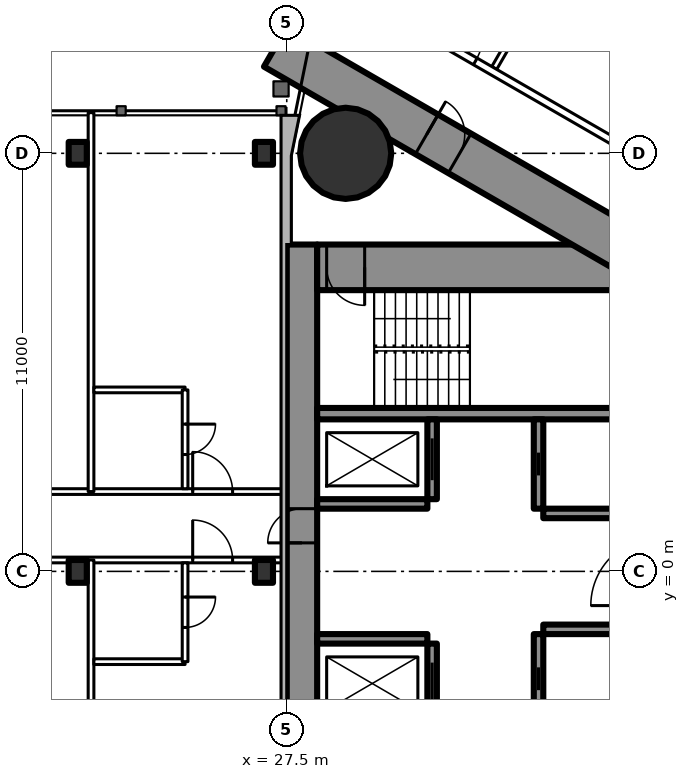
"""IFC4 building model, lengths in metres.
Left out: names, types, materials, properties, quantities, classifications, styles, units other than length and angle.
Written with IfcOpenShell. Run it as: python <this file> out.ifc"""

import sys

from ifc_helpers import new_model, si_unit, direction, frame, frame_2d, origin, origin_2d, place, context, subcontext, project, spatial, rectangle, circle, i_section, extrude, element, fill, save


model = new_model("IFC4")
c1 = context("Model", 3, precision=1e-05, world=origin(), true_north=direction((0.0, 1.0)))
c2 = subcontext(c1, "Body", "Model", "MODEL_VIEW")
j1 = project(units=[si_unit("LENGTHUNIT", "METRE"), si_unit("PLANEANGLEUNIT", "RADIAN")], contexts=[c1])
p1 = place(None, origin())
s1 = spatial("IfcSite", under=j1, at=p1, CompositionType="ELEMENT")
p2 = place(p1, origin())
s2 = spatial("IfcBuilding", under=s1, at=p2, CompositionType="ELEMENT")
p3 = place(p2, frame((0.0, 0.0, 226.1)))
s3 = spatial("IfcBuildingStorey", under=s2, at=p3, CompositionType="ELEMENT", Elevation=226.1)
p4 = place(p3, frame((29.05, 11.0, 0.0), z_axis=(0.0, 0.0, 1.0), x_axis=(1.0, 0.0, 0.0)))
e1 = element("IfcColumn", 1, at=p4, inside=s3, PredefinedType="COLUMN", context=c2, shape_type="SweptSolid", body=[
    extrude(circle(Radius=1.2, at=origin_2d()), origin(), (0.0, 0.0, 1.0), 3.6),
])
p5 = place(p3, frame((27.9, -8.6, 0.0), z_axis=(0.0, 0.0, 1.0), x_axis=(0.0, 1.0, 0.0)))
e2 = element("IfcWall", 2, at=p5, inside=s3, PredefinedType="SHEAR", context=c2, shape_type="SweptSolid", body=[
    extrude(rectangle(XDim=17.2, YDim=0.8, at=frame_2d((8.6, 0.0))), origin(), (0.0, 0.0, 1.0), 3.6),
])
p6 = place(p5, frame((9.35, 0.0, 0.0)))
e3 = element("IfcOpeningElement", 3, at=p6, cuts=e2, PredefinedType="OPENING", context=c2, shape_type="SweptSolid", body=[
    extrude(rectangle(XDim=0.9, YDim=2.2, at=frame_2d((0.45, 1.1))), frame((0.0, 0.41, 0.0), z_axis=(0.0, -1.0, 0.0), x_axis=(1.0, 0.0, 0.0)), (0.0, 0.0, 1.0), 0.82),
])
p7 = place(p3, frame((28.3, 8.0, 0.0), z_axis=(0.0, 0.0, 1.0), x_axis=(1.0, 0.0, 0.0)))
e4 = element("IfcWall", 4, at=p7, inside=s3, PredefinedType="SHEAR", context=c2, shape_type="SweptSolid", body=[
    extrude(rectangle(XDim=8.4, YDim=1.2, at=frame_2d((4.2, 0.0))), origin(), (0.0, 0.0, 1.0), 3.6),
])
p8 = place(p7, frame((0.25, 0.0, 0.0)))
e5 = element("IfcOpeningElement", 5, at=p8, cuts=e4, PredefinedType="OPENING", context=c2, shape_type="SweptSolid", body=[
    extrude(rectangle(XDim=1.0, YDim=2.2, at=frame_2d((0.5, 1.1))), frame((0.0, 0.61, 0.0), z_axis=(0.0, -1.0, 0.0), x_axis=(1.0, 0.0, 0.0)), (0.0, 0.0, 1.0), 1.22),
])
p9 = place(p3, frame((28.3, 4.15, 0.0), z_axis=(0.0, 0.0, 1.0), x_axis=(1.0, 0.0, 0.0)))
e6 = element("IfcWall", 6, at=p9, inside=s3, PredefinedType="SHEAR", context=c2, shape_type="SweptSolid", body=[
    extrude(rectangle(XDim=8.4, YDim=0.3, at=frame_2d((4.2, 0.0))), origin(), (0.0, 0.0, 1.0), 3.6),
])
p10 = place(p3, frame((31.325, -4.0, 0.0), z_axis=(0.0, 0.0, 1.0), x_axis=(0.0, 1.0, 0.0)))
e7 = element("IfcWall", 7, at=p10, inside=s3, PredefinedType="SHEAR", context=c2, shape_type="SweptSolid", body=[
    extrude(rectangle(XDim=2.1, YDim=0.25, at=frame_2d((1.05, 0.0))), origin(), (0.0, 0.0, 1.0), 3.6),
])
p11 = place(p10, frame((0.5, 0.0, 0.0)))
e8 = element("IfcOpeningElement", 8, at=p11, cuts=e7, PredefinedType="OPENING", context=c2, shape_type="SweptSolid", body=[
    extrude(rectangle(XDim=1.1, YDim=2.2, at=frame_2d((0.55, 1.1))), frame((0.0, 0.135, 0.0), z_axis=(0.0, -1.0, 0.0), x_axis=(1.0, 0.0, 0.0)), (0.0, 0.0, 1.0), 0.27),
])
p12 = place(p3, frame((34.125, -4.0, 0.0), z_axis=(0.0, 0.0, 1.0), x_axis=(0.0, 1.0, 0.0)))
e9 = element("IfcWall", 9, at=p12, inside=s3, PredefinedType="SHEAR", context=c2, shape_type="SweptSolid", body=[
    extrude(rectangle(XDim=2.35, YDim=0.25, at=frame_2d((1.175, 0.0))), origin(), (0.0, 0.0, 1.0), 3.6),
])
p13 = place(p12, frame((0.875, 0.0, 0.0)))
e10 = element("IfcOpeningElement", 10, at=p13, cuts=e9, PredefinedType="OPENING", context=c2, shape_type="SweptSolid", body=[
    extrude(rectangle(XDim=0.6, YDim=2.0, at=frame_2d((0.3, 1.0))), frame((0.0, 0.135, 0.0), z_axis=(0.0, -1.0, 0.0), x_axis=(1.0, 0.0, 0.0)), (0.0, 0.0, 1.0), 0.27),
])
p14 = place(p3, frame((28.3, -1.775, 0.0), z_axis=(0.0, 0.0, 1.0), x_axis=(1.0, 0.0, 0.0)))
e11 = element("IfcWall", 11, at=p14, inside=s3, PredefinedType="SHEAR", context=c2, shape_type="SweptSolid", body=[
    extrude(rectangle(XDim=2.9, YDim=0.25, at=frame_2d((1.45, 0.0))), origin(), (0.0, 0.0, 1.0), 3.6),
])
p15 = place(p3, frame((34.25, -1.525, 0.0), z_axis=(0.0, 0.0, 1.0), x_axis=(1.0, 0.0, 0.0)))
e12 = element("IfcWall", 12, at=p15, inside=s3, PredefinedType="SHEAR", context=c2, shape_type="SweptSolid", body=[
    extrude(rectangle(XDim=2.45, YDim=0.25, at=frame_2d((1.225, 0.0))), origin(), (0.0, 0.0, 1.0), 3.6),
])
p16 = place(p3, frame((31.325, 1.9, 0.0), z_axis=(0.0, 0.0, 1.0), x_axis=(0.0, 1.0, 0.0)))
e13 = element("IfcWall", 13, at=p16, inside=s3, PredefinedType="SHEAR", context=c2, shape_type="SweptSolid", body=[
    extrude(rectangle(XDim=2.1, YDim=0.25, at=frame_2d((1.05, 0.0))), origin(), (0.0, 0.0, 1.0), 3.6),
])
p17 = place(p16, frame((0.5, 0.0, 0.0)))
e14 = element("IfcOpeningElement", 14, at=p17, cuts=e13, PredefinedType="OPENING", context=c2, shape_type="SweptSolid", body=[
    extrude(rectangle(XDim=1.1, YDim=2.2, at=frame_2d((0.55, 1.1))), frame((0.0, 0.135, 0.0), z_axis=(0.0, -1.0, 0.0), x_axis=(1.0, 0.0, 0.0)), (0.0, 0.0, 1.0), 0.27),
])
p18 = place(p3, frame((34.125, 1.65, 0.0), z_axis=(0.0, 0.0, 1.0), x_axis=(0.0, 1.0, 0.0)))
e15 = element("IfcWall", 15, at=p18, inside=s3, PredefinedType="SHEAR", context=c2, shape_type="SweptSolid", body=[
    extrude(rectangle(XDim=2.35, YDim=0.25, at=frame_2d((1.175, 0.0))), origin(), (0.0, 0.0, 1.0), 3.6),
])
p19 = place(p18, frame((0.875, 0.0, 0.0)))
e16 = element("IfcOpeningElement", 16, at=p19, cuts=e15, PredefinedType="OPENING", context=c2, shape_type="SweptSolid", body=[
    extrude(rectangle(XDim=0.6, YDim=2.0, at=frame_2d((0.3, 1.0))), frame((0.0, 0.135, 0.0), z_axis=(0.0, -1.0, 0.0), x_axis=(1.0, 0.0, 0.0)), (0.0, 0.0, 1.0), 0.27),
])
p20 = place(p3, frame((28.3, 1.775, 0.0), z_axis=(0.0, 0.0, 1.0), x_axis=(1.0, 0.0, 0.0)))
e17 = element("IfcWall", 17, at=p20, inside=s3, PredefinedType="SHEAR", context=c2, shape_type="SweptSolid", body=[
    extrude(rectangle(XDim=2.9, YDim=0.25, at=frame_2d((1.45, 0.0))), origin(), (0.0, 0.0, 1.0), 3.6),
])
p21 = place(p3, frame((34.25, 1.525, 0.0), z_axis=(0.0, 0.0, 1.0), x_axis=(1.0, 0.0, 0.0)))
e18 = element("IfcWall", 18, at=p21, inside=s3, PredefinedType="SHEAR", context=c2, shape_type="SweptSolid", body=[
    extrude(rectangle(XDim=2.45, YDim=0.25, at=frame_2d((1.225, 0.0))), origin(), (0.0, 0.0, 1.0), 3.6),
])
p22 = place(p3, frame((27.2, -13.8, 0.0), z_axis=(0.0, 0.0, 1.0), x_axis=(0.866027159892, 0.499996958321, 0.0)))
e19 = element("IfcWall", 19, at=p22, inside=s3, PredefinedType="SHEAR", context=c2, shape_type="SweptSolid", body=[
    extrude(rectangle(XDim=27.947, YDim=1.2, at=frame_2d((13.973, 0.0))), origin(), (0.0, 0.0, 1.0), 3.6),
])
p23 = place(p22, frame((4.6, 0.0, 0.0)))
e20 = element("IfcOpeningElement", 20, at=p23, cuts=e19, PredefinedType="OPENING", context=c2, shape_type="SweptSolid", body=[
    extrude(rectangle(XDim=1.0, YDim=2.2, at=frame_2d((0.5, 1.1))), frame((0.0, 0.61, 0.0), z_axis=(0.0, -1.0, 0.0), x_axis=(1.0, 0.0, 0.0)), (0.0, 0.0, 1.0), 1.22),
])
p24 = place(p22, frame((13.395, 0.0, 0.0)))
e21 = element("IfcOpeningElement", 21, at=p24, cuts=e19, PredefinedType="OPENING", context=c2, shape_type="SweptSolid", body=[
    extrude(rectangle(XDim=1.8, YDim=2.2, at=frame_2d((0.9, 1.1))), frame((0.0, 0.61, 0.0), z_axis=(0.0, -1.0, 0.0), x_axis=(1.0, 0.0, 0.0)), (0.0, 0.0, 1.0), 1.22),
])
p25 = place(p3, frame((27.2, 13.8, 0.0), z_axis=(0.0, 0.0, 1.0), x_axis=(0.866024515034, -0.500001539357, 0.0)))
e22 = element("IfcWall", 22, at=p25, inside=s3, PredefinedType="SHEAR", context=c2, shape_type="SweptSolid", body=[
    extrude(rectangle(XDim=26.907, YDim=1.2, at=frame_2d((13.454, 0.0))), origin(), (0.0, 0.0, 1.0), 3.6),
])
p26 = place(p25, frame((4.6, 0.0, 0.0)))
e23 = element("IfcOpeningElement", 23, at=p26, cuts=e22, PredefinedType="OPENING", context=c2, shape_type="SweptSolid", body=[
    extrude(rectangle(XDim=1.0, YDim=2.2, at=frame_2d((0.5, 1.1))), frame((0.0, 0.61, 0.0), z_axis=(0.0, -1.0, 0.0), x_axis=(1.0, 0.0, 0.0)), (0.0, 0.0, 1.0), 1.22),
])
p27 = place(p25, frame((13.395, 0.0, 0.0)))
e24 = element("IfcOpeningElement", 24, at=p27, cuts=e22, PredefinedType="OPENING", context=c2, shape_type="SweptSolid", body=[
    extrude(rectangle(XDim=1.8, YDim=2.2, at=frame_2d((0.9, 1.1))), frame((0.0, 0.61, 0.0), z_axis=(0.0, -1.0, 0.0), x_axis=(1.0, 0.0, 0.0)), (0.0, 0.0, 1.0), 1.22),
])
for number, where, z_axis, x_axis in (
    (25, (22.0, 0.0, 0.0), (0.0, 0.0, 1.0), (1.0, 0.0, 0.0)),
    (26, (26.9, 0.0, 0.0), (0.0, 0.0, 1.0), (1.0, 0.0, 0.0)),
    (27, (22.0, 11.0, 0.0), (0.0, 0.0, 1.0), (1.0, 0.0, 0.0)),
    (28, (26.9, 11.0, 0.0), (0.0, 0.0, 1.0), (1.0, 0.0, 0.0)),
):
    element("IfcColumn", number, at=place(p3, frame(where, z_axis=z_axis, x_axis=x_axis)), inside=s3, PredefinedType="COLUMN", context=c2, shape_type="SweptSolid", body=[
        extrude(i_section(OverallWidth=0.476, OverallDepth=0.6, WebThickness=0.1, FlangeThickness=0.14, FilletRadius=0.02, at=origin_2d()), origin(), (0.0, 0.0, 1.0), 3.6),
    ])
p28 = place(p3, frame((32.96, 13.246, 0.0), z_axis=(0.0, 0.0, 1.0), x_axis=(0.500000236886, 0.866025267018, 0.0)))
e29 = element("IfcWall", 29, at=p28, inside=s3, PredefinedType="PARTITIONING", context=c2, shape_type="SweptSolid", body=[
    extrude(rectangle(XDim=7.583, YDim=0.15, at=frame_2d((3.791, 0.0))), origin(), (0.0, 0.0, 1.0), 3.35),
])
p29 = place(p3, frame((28.959, 15.44, 0.0), z_axis=(0.0, 0.0, 1.0), x_axis=(0.866028936079, -0.499993881836, 0.0)))
e30 = element("IfcWall", 30, at=p29, inside=s3, PredefinedType="PARTITIONING", context=c2, shape_type="SweptSolid", body=[
    extrude(rectangle(XDim=20.503, YDim=0.2, at=frame_2d((10.251, 0.0))), origin(), (0.0, 0.0, 1.0), 3.35),
])
p30 = place(p29, frame((16.137, 0.0, 0.0)))
e31 = element("IfcOpeningElement", 31, at=p30, cuts=e30, PredefinedType="OPENING", context=c2, shape_type="SweptSolid", body=[
    extrude(rectangle(XDim=0.95, YDim=2.2, at=frame_2d((0.475, 1.1))), frame((0.0, 0.11, 0.0), z_axis=(0.0, -1.0, 0.0), x_axis=(1.0, 0.0, 0.0)), (0.0, 0.0, 1.0), 0.22),
])
p31 = place(p29, frame((14.437, 0.0, 0.0)))
e32 = element("IfcOpeningElement", 32, at=p31, cuts=e30, PredefinedType="OPENING", context=c2, shape_type="SweptSolid", body=[
    extrude(rectangle(XDim=0.95, YDim=2.2, at=frame_2d((0.475, 1.1))), frame((0.0, 0.11, 0.0), z_axis=(0.0, -1.0, 0.0), x_axis=(1.0, 0.0, 0.0)), (0.0, 0.0, 1.0), 0.22),
])
p32 = place(p29, frame((2.244, 0.0, 0.0)))
e33 = element("IfcOpeningElement", 33, at=p32, cuts=e30, PredefinedType="OPENING", context=c2, shape_type="SweptSolid", body=[
    extrude(rectangle(XDim=1.8, YDim=2.04, at=frame_2d((0.9, 1.02))), frame((0.0, 0.11, 0.0), z_axis=(0.0, -1.0, 0.0), x_axis=(1.0, 0.0, 0.0)), (0.0, 0.0, 1.0), 0.22),
])
p33 = place(p3, frame((-27.5, 0.3, 0.0), z_axis=(0.0, 0.0, 1.0), x_axis=(1.0, 0.0, 0.0)))
e34 = element("IfcWall", 34, at=p33, inside=s3, PredefinedType="PARTITIONING", context=c2, shape_type="SweptSolid", body=[
    extrude(rectangle(XDim=55.0, YDim=0.15, at=frame_2d((27.5, 0.0))), origin(), (0.0, 0.0, 1.0), 2.4),
])
p34 = place(p33, frame((1.575, 0.0, 0.0)))
e35 = element("IfcOpeningElement", 35, at=p34, cuts=e34, PredefinedType="OPENING", context=c2, shape_type="SweptSolid", body=[
    extrude(rectangle(XDim=1.0, YDim=2.2, at=frame_2d((0.5, 1.1))), frame((0.0, 0.085, 0.0), z_axis=(0.0, -1.0, 0.0), x_axis=(1.0, 0.0, 0.0)), (0.0, 0.0, 1.0), 0.17),
])
p35 = place(p33, frame((7.525, 0.0, 0.0)))
e36 = element("IfcOpeningElement", 36, at=p35, cuts=e34, PredefinedType="OPENING", context=c2, shape_type="SweptSolid", body=[
    extrude(rectangle(XDim=1.05, YDim=2.4, at=frame_2d((0.525, 1.2))), frame((0.0, 0.085, 0.0), z_axis=(0.0, -1.0, 0.0), x_axis=(1.0, 0.0, 0.0)), (0.0, 0.0, 1.0), 0.17),
])
p36 = place(p33, frame((18.525, 0.0, 0.0)))
e37 = element("IfcOpeningElement", 37, at=p36, cuts=e34, PredefinedType="OPENING", context=c2, shape_type="SweptSolid", body=[
    extrude(rectangle(XDim=1.05, YDim=2.4, at=frame_2d((0.525, 1.2))), frame((0.0, 0.085, 0.0), z_axis=(0.0, -1.0, 0.0), x_axis=(1.0, 0.0, 0.0)), (0.0, 0.0, 1.0), 0.17),
])
p37 = place(p33, frame((24.025, 0.0, 0.0)))
e38 = element("IfcOpeningElement", 38, at=p37, cuts=e34, PredefinedType="OPENING", context=c2, shape_type="SweptSolid", body=[
    extrude(rectangle(XDim=1.05, YDim=2.4, at=frame_2d((0.525, 1.2))), frame((0.0, 0.085, 0.0), z_axis=(0.0, -1.0, 0.0), x_axis=(1.0, 0.0, 0.0)), (0.0, 0.0, 1.0), 0.17),
])
p38 = place(p33, frame((35.025, 0.0, 0.0)))
e39 = element("IfcOpeningElement", 39, at=p38, cuts=e34, PredefinedType="OPENING", context=c2, shape_type="SweptSolid", body=[
    extrude(rectangle(XDim=1.05, YDim=2.4, at=frame_2d((0.525, 1.2))), frame((0.0, 0.085, 0.0), z_axis=(0.0, -1.0, 0.0), x_axis=(1.0, 0.0, 0.0)), (0.0, 0.0, 1.0), 0.17),
])
p39 = place(p33, frame((40.525, 0.0, 0.0)))
e40 = element("IfcOpeningElement", 40, at=p39, cuts=e34, PredefinedType="OPENING", context=c2, shape_type="SweptSolid", body=[
    extrude(rectangle(XDim=1.05, YDim=2.4, at=frame_2d((0.525, 1.2))), frame((0.0, 0.085, 0.0), z_axis=(0.0, -1.0, 0.0), x_axis=(1.0, 0.0, 0.0)), (0.0, 0.0, 1.0), 0.17),
])
p40 = place(p33, frame((52.525, 0.0, 0.0)))
e41 = element("IfcOpeningElement", 41, at=p40, cuts=e34, PredefinedType="OPENING", context=c2, shape_type="SweptSolid", body=[
    extrude(rectangle(XDim=1.05, YDim=2.4, at=frame_2d((0.525, 1.2))), frame((0.0, 0.085, 0.0), z_axis=(0.0, -1.0, 0.0), x_axis=(1.0, 0.0, 0.0)), (0.0, 0.0, 1.0), 0.17),
])
p41 = place(p3, frame((5.85, 2.1, 0.0), z_axis=(0.0, 0.0, 1.0), x_axis=(1.0, 0.0, 0.0)))
e42 = element("IfcWall", 42, at=p41, inside=s3, PredefinedType="PARTITIONING", context=c2, shape_type="SweptSolid", body=[
    extrude(rectangle(XDim=21.65, YDim=0.15, at=frame_2d((10.825, 0.0))), origin(), (0.0, 0.0, 1.0), 3.4),
])
p42 = place(p41, frame((1.675, 0.0, 0.0)))
e43 = element("IfcOpeningElement", 43, at=p42, cuts=e42, PredefinedType="OPENING", context=c2, shape_type="SweptSolid", body=[
    extrude(rectangle(XDim=1.05, YDim=2.4, at=frame_2d((0.525, 1.2))), frame((0.0, 0.085, 0.0), z_axis=(0.0, -1.0, 0.0), x_axis=(1.0, 0.0, 0.0)), (0.0, 0.0, 1.0), 0.17),
])
p43 = place(p41, frame((7.175, 0.0, 0.0)))
e44 = element("IfcOpeningElement", 44, at=p43, cuts=e42, PredefinedType="OPENING", context=c2, shape_type="SweptSolid", body=[
    extrude(rectangle(XDim=1.05, YDim=2.4, at=frame_2d((0.525, 1.2))), frame((0.0, 0.085, 0.0), z_axis=(0.0, -1.0, 0.0), x_axis=(1.0, 0.0, 0.0)), (0.0, 0.0, 1.0), 0.17),
])
p44 = place(p41, frame((19.175, 0.0, 0.0)))
e45 = element("IfcOpeningElement", 45, at=p44, cuts=e42, PredefinedType="OPENING", context=c2, shape_type="SweptSolid", body=[
    extrude(rectangle(XDim=1.05, YDim=2.4, at=frame_2d((0.525, 1.2))), frame((0.0, 0.085, 0.0), z_axis=(0.0, -1.0, 0.0), x_axis=(1.0, 0.0, 0.0)), (0.0, 0.0, 1.0), 0.17),
])
p45 = place(p3, frame((22.35, -12.07, 0.0), z_axis=(0.0, 0.0, 1.0), x_axis=(0.0, 1.0, 0.0)))
e46 = element("IfcWall", 46, at=p45, inside=s3, PredefinedType="PARTITIONING", context=c2, shape_type="SweptSolid", body=[
    extrude(rectangle(XDim=12.37, YDim=0.15, at=frame_2d((6.185, 0.0))), origin(), (0.0, 0.0, 1.0), 3.4),
])
p46 = place(p3, frame((22.425, -2.375, 0.0), z_axis=(0.0, 0.0, 1.0), x_axis=(1.0, 0.0, 0.0)))
e47 = element("IfcWall", 47, at=p46, inside=s3, PredefinedType="PARTITIONING", context=c2, shape_type="SweptSolid", body=[
    extrude(rectangle(XDim=2.4, YDim=0.15, at=frame_2d((1.2, 0.0))), origin(), (0.0, 0.0, 1.0), 3.4),
])
p47 = place(p3, frame((24.825, -2.375, 0.0), z_axis=(0.0, 0.0, 1.0), x_axis=(0.0, 1.0, 0.0)))
e48 = element("IfcWall", 48, at=p47, inside=s3, PredefinedType="PARTITIONING", context=c2, shape_type="SweptSolid", body=[
    extrude(rectangle(XDim=2.6, YDim=0.15, at=frame_2d((1.3, 0.0))), origin(), (0.0, 0.0, 1.0), 3.4),
])
p48 = place(p47, frame((0.9, 0.0, 0.0)))
e49 = element("IfcOpeningElement", 49, at=p48, cuts=e48, PredefinedType="OPENING", context=c2, shape_type="SweptSolid", body=[
    extrude(rectangle(XDim=0.8, YDim=2.2, at=frame_2d((0.4, 1.1))), frame((0.0, 0.085, 0.0), z_axis=(0.0, -1.0, 0.0), x_axis=(1.0, 0.0, 0.0)), (0.0, 0.0, 1.0), 0.17),
])
p49 = place(p3, frame((22.35, 2.1, 0.0), z_axis=(0.0, 0.0, 1.0), x_axis=(0.0, 1.0, 0.0)))
e50 = element("IfcWall", 50, at=p49, inside=s3, PredefinedType="PARTITIONING", context=c2, shape_type="SweptSolid", body=[
    extrude(rectangle(XDim=9.97, YDim=0.15, at=frame_2d((4.985, 0.0))), origin(), (0.0, 0.0, 1.0), 3.4),
])
p50 = place(p3, frame((22.425, 4.775, 0.0), z_axis=(0.0, 0.0, 1.0), x_axis=(1.0, 0.0, 0.0)))
e51 = element("IfcWall", 51, at=p50, inside=s3, PredefinedType="PARTITIONING", context=c2, shape_type="SweptSolid", body=[
    extrude(rectangle(XDim=2.4, YDim=0.15, at=frame_2d((1.2, 0.0))), origin(), (0.0, 0.0, 1.0), 3.4),
])
p51 = place(p3, frame((24.825, 2.175, 0.0), z_axis=(0.0, 0.0, 1.0), x_axis=(0.0, 1.0, 0.0)))
e52 = element("IfcWall", 52, at=p51, inside=s3, PredefinedType="PARTITIONING", context=c2, shape_type="SweptSolid", body=[
    extrude(rectangle(XDim=2.6, YDim=0.15, at=frame_2d((1.3, 0.0))), origin(), (0.0, 0.0, 1.0), 3.4),
])
p52 = place(p51, frame((0.9, 0.0, 0.0)))
e53 = element("IfcOpeningElement", 53, at=p52, cuts=e52, PredefinedType="OPENING", context=c2, shape_type="SweptSolid", body=[
    extrude(rectangle(XDim=0.8, YDim=2.2, at=frame_2d((0.4, 1.1))), frame((0.0, 0.085, 0.0), z_axis=(0.0, -1.0, 0.0), x_axis=(1.0, 0.0, 0.0)), (0.0, 0.0, 1.0), 0.17),
])
p53 = place(p32, origin())
e54 = element("IfcDoor", 54, at=p53, inside=s3, OperationType="DOUBLE_DOOR_SINGLE_SWING", PredefinedType="DOOR", context=c2, shape_type="SweptSolid", body=[
    extrude(rectangle(XDim=1.8, YDim=2.04, at=frame_2d((0.9, 1.02))), frame((0.0, 0.025, 0.0), z_axis=(0.0, -1.0, 0.0), x_axis=(1.0, 0.0, 0.0)), (0.0, 0.0, 1.0), 0.05),
])
fill(e33, e54)
p54 = place(p26, origin())
e55 = element("IfcDoor", 55, at=p54, inside=s3, OperationType="SINGLE_SWING_LEFT", PredefinedType="DOOR", context=c2, shape_type="SweptSolid", body=[
    extrude(rectangle(XDim=1.0, YDim=2.2, at=frame_2d((0.5, 1.1))), frame((0.0, 0.025, 0.0), z_axis=(0.0, -1.0, 0.0), x_axis=(1.0, 0.0, 0.0)), (0.0, 0.0, 1.0), 0.05),
])
fill(e23, e55)
p55 = place(p8, origin())
e56 = element("IfcDoor", 56, at=p55, inside=s3, OperationType="SINGLE_SWING_RIGHT", PredefinedType="DOOR", context=c2, shape_type="SweptSolid", body=[
    extrude(rectangle(XDim=1.0, YDim=2.2, at=frame_2d((0.5, 1.1))), frame((0.0, 0.025, 0.0), z_axis=(0.0, -1.0, 0.0), x_axis=(1.0, 0.0, 0.0)), (0.0, 0.0, 1.0), 0.05),
])
fill(e5, e56)
p56 = place(p6, origin())
e57 = element("IfcDoor", 57, at=p56, inside=s3, OperationType="SINGLE_SWING_LEFT", PredefinedType="DOOR", context=c2, shape_type="SweptSolid", body=[
    extrude(rectangle(XDim=0.9, YDim=2.2, at=frame_2d((0.45, 1.1))), frame((0.0, 0.025, 0.0), z_axis=(0.0, -1.0, 0.0), x_axis=(1.0, 0.0, 0.0)), (0.0, 0.0, 1.0), 0.05),
])
fill(e3, e57)
p57 = place(p48, origin())
e58 = element("IfcDoor", 58, at=p57, inside=s3, OperationType="SINGLE_SWING_RIGHT", PredefinedType="DOOR", context=c2, shape_type="SweptSolid", body=[
    extrude(rectangle(XDim=0.8, YDim=2.2, at=frame_2d((0.4, 1.1))), frame((0.0, 0.025, 0.0), z_axis=(0.0, -1.0, 0.0), x_axis=(1.0, 0.0, 0.0)), (0.0, 0.0, 1.0), 0.05),
])
fill(e49, e58)
p58 = place(p40, origin())
e59 = element("IfcDoor", 59, at=p58, inside=s3, OperationType="SINGLE_SWING_LEFT", PredefinedType="DOOR", context=c2, shape_type="SweptSolid", body=[
    extrude(rectangle(XDim=1.05, YDim=2.4, at=frame_2d((0.525, 1.2))), frame((0.0, 0.025, 0.0), z_axis=(0.0, -1.0, 0.0), x_axis=(1.0, 0.0, 0.0)), (0.0, 0.0, 1.0), 0.05),
])
fill(e41, e59)
p59 = place(p52, origin())
e60 = element("IfcDoor", 60, at=p59, inside=s3, OperationType="SINGLE_SWING_RIGHT", PredefinedType="DOOR", context=c2, shape_type="SweptSolid", body=[
    extrude(rectangle(XDim=0.8, YDim=2.2, at=frame_2d((0.4, 1.1))), frame((0.0, 0.025, 0.0), z_axis=(0.0, -1.0, 0.0), x_axis=(1.0, 0.0, 0.0)), (0.0, 0.0, 1.0), 0.05),
])
fill(e53, e60)
p60 = place(p44, origin())
e61 = element("IfcDoor", 61, at=p60, inside=s3, OperationType="SINGLE_SWING_LEFT", PredefinedType="DOOR", context=c2, shape_type="SweptSolid", body=[
    extrude(rectangle(XDim=1.05, YDim=2.4, at=frame_2d((0.525, 1.2))), frame((0.0, 0.025, 0.0), z_axis=(0.0, -1.0, 0.0), x_axis=(1.0, 0.0, 0.0)), (0.0, 0.0, 1.0), 0.05),
])
fill(e45, e61)
p61 = place(p11, origin())
e62 = element("IfcDoor", 62, at=p61, inside=s3, OperationType="SLIDING_TO_LEFT", PredefinedType="USERDEFINED", context=c2, shape_type="SweptSolid", body=[
    extrude(rectangle(XDim=1.1, YDim=2.2, at=frame_2d((0.55, 1.1))), frame((0.0, 0.025, 0.0), z_axis=(0.0, -1.0, 0.0), x_axis=(1.0, 0.0, 0.0)), (0.0, 0.0, 1.0), 0.05),
])
fill(e8, e62)
p62 = place(p17, origin())
e63 = element("IfcDoor", 63, at=p62, inside=s3, OperationType="SLIDING_TO_LEFT", PredefinedType="USERDEFINED", context=c2, shape_type="SweptSolid", body=[
    extrude(rectangle(XDim=1.1, YDim=2.2, at=frame_2d((0.55, 1.1))), frame((0.0, 0.025, 0.0), z_axis=(0.0, -1.0, 0.0), x_axis=(1.0, 0.0, 0.0)), (0.0, 0.0, 1.0), 0.05),
])
fill(e14, e63)
p63 = place(p13, origin())
e64 = element("IfcDoor", 64, at=p63, inside=s3, OperationType="SLIDING_TO_LEFT", PredefinedType="DOOR", context=c2, shape_type="SweptSolid", body=[
    extrude(rectangle(XDim=0.6, YDim=2.0, at=frame_2d((0.3, 1.0))), frame((0.0, 0.025, 0.0), z_axis=(0.0, -1.0, 0.0), x_axis=(1.0, 0.0, 0.0)), (0.0, 0.0, 1.0), 0.05),
])
fill(e10, e64)
p64 = place(p19, origin())
e65 = element("IfcDoor", 65, at=p64, inside=s3, OperationType="SLIDING_TO_LEFT", PredefinedType="DOOR", context=c2, shape_type="SweptSolid", body=[
    extrude(rectangle(XDim=0.6, YDim=2.0, at=frame_2d((0.3, 1.0))), frame((0.0, 0.025, 0.0), z_axis=(0.0, -1.0, 0.0), x_axis=(1.0, 0.0, 0.0)), (0.0, 0.0, 1.0), 0.05),
])
fill(e16, e65)
save(model, sys.argv[1])
